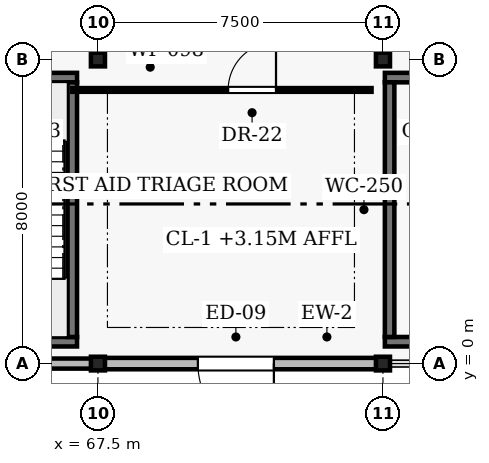
"""IFC4 building model, lengths in metres.
Left out: names, types, materials, properties, quantities, classifications, styles, units other than length and angle.
Written with IfcOpenShell. Run it as: python <this file> out.ifc"""

import sys

from ifc_helpers import new_model, si_unit, direction, frame, frame_2d, origin, origin_2d, place, context, subcontext, project, spatial, rectangle, i_section, extrude, element, fill, save


model = new_model("IFC4")
c1 = context("Model", 3, precision=1e-05, world=origin(), true_north=direction((0.0, 1.0)))
c2 = subcontext(c1, "Body", "Model", "MODEL_VIEW")
j1 = project(units=[si_unit("LENGTHUNIT", "METRE"), si_unit("PLANEANGLEUNIT", "RADIAN")], contexts=[c1])
p1 = place(None, origin())
s1 = spatial("IfcSite", under=j1, at=p1, CompositionType="ELEMENT")
p2 = place(p1, origin())
s2 = spatial("IfcBuilding", under=s1, at=p2, CompositionType="ELEMENT")
p3 = place(p2, origin())
s3 = spatial("IfcBuildingStorey", under=s2, at=p3, CompositionType="ELEMENT", Elevation=0.0)
for number, where, z_axis, x_axis in (
    (1, (67.5, 0.0, 0.0), (0.0, 0.0, 1.0), (1.0, 0.0, 0.0)),
    (2, (67.5, 8.0, 0.0), (0.0, 0.0, 1.0), (1.0, 0.0, 0.0)),
    (3, (75.0, 0.0, 0.0), (0.0, 0.0, 1.0), (1.0, 0.0, 0.0)),
    (4, (75.0, 8.0, 0.0), (0.0, 0.0, 1.0), (1.0, 0.0, 0.0)),
):
    element("IfcColumn", number, at=place(p3, frame(where, z_axis=z_axis, x_axis=x_axis)), inside=s3, PredefinedType="COLUMN", context=c2, shape_type="SweptSolid", body=[
        extrude(i_section(OverallWidth=0.37, OverallDepth=0.36, WebThickness=0.012, FlangeThickness=0.02, FilletRadius=0.015, at=origin_2d()), origin(), (0.0, 0.0, 1.0), 4.5),
    ])
p4 = place(p3, frame((60.08, 0.0, 0.0), z_axis=(0.0, 0.0, 1.0), x_axis=(1.0, 0.0, 0.0)))
e5 = element("IfcWall", 5, at=p4, inside=s3, PredefinedType="SOLIDWALL", context=c2, shape_type="SweptSolid", body=[
    extrude(rectangle(XDim=7.34, YDim=0.265, at=frame_2d((3.67, 0.0))), origin(), (0.0, 0.0, 1.0), 3.85),
])
p5 = place(p4, frame((1.2, 0.0, 1.05)))
e6 = element("IfcOpeningElement", 6, at=p5, cuts=e5, PredefinedType="OPENING", context=c2, shape_type="SweptSolid", body=[
    extrude(rectangle(XDim=1.2, YDim=1.8, at=frame_2d((0.6, 0.9))), frame((0.0, 0.142, 0.0), z_axis=(0.0, -1.0, 0.0), x_axis=(1.0, 0.0, 0.0)), (0.0, 0.0, 1.0), 0.285),
])
p6 = place(p4, frame((4.1, 0.0, 1.05)))
e7 = element("IfcOpeningElement", 7, at=p6, cuts=e5, PredefinedType="OPENING", context=c2, shape_type="SweptSolid", body=[
    extrude(rectangle(XDim=1.35, YDim=1.35, at=frame_2d((0.675, 0.675))), frame((0.0, 0.142, 0.0), z_axis=(0.0, -1.0, 0.0), x_axis=(1.0, 0.0, 0.0)), (0.0, 0.0, 1.0), 0.285),
])
p7 = place(p3, frame((67.58, 0.0, 0.0), z_axis=(0.0, 0.0, 1.0), x_axis=(1.0, 0.0, 0.0)))
e8 = element("IfcWall", 8, at=p7, inside=s3, PredefinedType="SOLIDWALL", context=c2, shape_type="SweptSolid", body=[
    extrude(rectangle(XDim=7.34, YDim=0.3, at=frame_2d((3.67, 0.0))), origin(), (0.0, 0.0, 1.0), 3.75),
])
p8 = place(p7, frame((2.55, 0.0, 0.0)))
e9 = element("IfcOpeningElement", 9, at=p8, cuts=e8, PredefinedType="OPENING", context=c2, shape_type="SweptSolid", body=[
    extrude(rectangle(XDim=2.0, YDim=2.2, at=frame_2d((1.0, 1.1))), frame((0.0, 0.16, 0.0), z_axis=(0.0, -1.0, 0.0), x_axis=(1.0, 0.0, 0.0)), (0.0, 0.0, 1.0), 0.32),
])
p9 = place(p3, frame((60.55, 0.575, 0.0), z_axis=(0.0, 0.0, 1.0), x_axis=(1.0, 0.0, 0.0)))
e10 = element("IfcWall", 10, at=p9, inside=s3, PredefinedType="SHEAR", context=c2, shape_type="SweptSolid", body=[
    extrude(rectangle(XDim=6.4, YDim=0.25, at=frame_2d((3.2, 0.0))), origin(), (0.0, 0.0, 1.0), 4.5),
])
p10 = place(p3, frame((60.55, 7.525, 0.0), z_axis=(0.0, 0.0, 1.0), x_axis=(1.0, 0.0, 0.0)))
e11 = element("IfcWall", 11, at=p10, inside=s3, PredefinedType="SHEAR", context=c2, shape_type="SweptSolid", body=[
    extrude(rectangle(XDim=6.4, YDim=0.25, at=frame_2d((3.2, 0.0))), origin(), (0.0, 0.0, 1.0), 4.5),
])
p11 = place(p10, frame((0.8, 0.0, 0.0)))
e12 = element("IfcOpeningElement", 12, at=p11, cuts=e11, PredefinedType="OPENING", context=c2, shape_type="SweptSolid", body=[
    extrude(rectangle(XDim=1.1, YDim=2.15, at=frame_2d((0.55, 1.075))), frame((0.0, 0.135, 0.0), z_axis=(0.0, -1.0, 0.0), x_axis=(1.0, 0.0, 0.0)), (0.0, 0.0, 1.0), 0.27),
])
p12 = place(p10, frame((3.775, 0.0, 0.0)))
e13 = element("IfcOpeningElement", 13, at=p12, cuts=e11, PredefinedType="OPENING", context=c2, shape_type="SweptSolid", body=[
    extrude(rectangle(XDim=1.25, YDim=2.15, at=frame_2d((0.625, 1.075))), frame((0.0, 0.135, 0.0), z_axis=(0.0, -1.0, 0.0), x_axis=(1.0, 0.0, 0.0)), (0.0, 0.0, 1.0), 0.27),
])
p13 = place(p3, frame((66.825, 0.7, 0.0), z_axis=(0.0, 0.0, 1.0), x_axis=(0.0, 1.0, 0.0)))
e14 = element("IfcWall", 14, at=p13, inside=s3, PredefinedType="SHEAR", context=c2, shape_type="SweptSolid", body=[
    extrude(rectangle(XDim=6.7, YDim=0.25, at=frame_2d((3.35, 0.0))), origin(), (0.0, 0.0, 1.0), 4.5),
])
p14 = place(p3, frame((75.05, 0.575, 0.0), z_axis=(0.0, 0.0, 1.0), x_axis=(1.0, 0.0, 0.0)))
e15 = element("IfcWall", 15, at=p14, inside=s3, PredefinedType="SHEAR", context=c2, shape_type="SweptSolid", body=[
    extrude(rectangle(XDim=6.4, YDim=0.25, at=frame_2d((3.2, 0.0))), origin(), (0.0, 0.0, 1.0), 4.5),
])
p15 = place(p3, frame((75.05, 7.525, 0.0), z_axis=(0.0, 0.0, 1.0), x_axis=(1.0, 0.0, 0.0)))
e16 = element("IfcWall", 16, at=p15, inside=s3, PredefinedType="SHEAR", context=c2, shape_type="SweptSolid", body=[
    extrude(rectangle(XDim=6.4, YDim=0.25, at=frame_2d((3.2, 0.0))), origin(), (0.0, 0.0, 1.0), 4.5),
])
p16 = place(p15, frame((3.775, 0.0, 0.0)))
e17 = element("IfcOpeningElement", 17, at=p16, cuts=e16, PredefinedType="OPENING", context=c2, shape_type="SweptSolid", body=[
    extrude(rectangle(XDim=1.25, YDim=2.15, at=frame_2d((0.625, 1.075))), frame((0.0, 0.135, 0.0), z_axis=(0.0, -1.0, 0.0), x_axis=(1.0, 0.0, 0.0)), (0.0, 0.0, 1.0), 0.27),
])
p17 = place(p3, frame((75.175, 0.7, 0.0), z_axis=(0.0, 0.0, 1.0), x_axis=(0.0, 1.0, 0.0)))
e18 = element("IfcWall", 18, at=p17, inside=s3, PredefinedType="SHEAR", context=c2, shape_type="SweptSolid", body=[
    extrude(rectangle(XDim=6.7, YDim=0.25, at=frame_2d((3.35, 0.0))), origin(), (0.0, 0.0, 1.0), 4.5),
])
p18 = place(p3, frame((66.825, 7.2, 0.0), z_axis=(0.0, 0.0, 1.0), x_axis=(1.0, 0.0, 0.0)))
e19 = element("IfcWall", 19, at=p18, inside=s3, PredefinedType="PARTITIONING", context=c2, shape_type="SweptSolid", body=[
    extrude(rectangle(XDim=7.875, YDim=0.098, at=frame_2d((3.938, 0.0))), origin(), (0.0, 0.0, 1.0), 3.7),
])
p19 = place(p18, frame((4.101, 0.0, 0.0)))
e20 = element("IfcOpeningElement", 20, at=p19, cuts=e19, PredefinedType="OPENING", context=c2, shape_type="SweptSolid", body=[
    extrude(rectangle(XDim=1.26, YDim=2.16, at=frame_2d((0.63, 1.08))), frame((0.0, 0.059, 0.0), z_axis=(0.0, -1.0, 0.0), x_axis=(1.0, 0.0, 0.0)), (0.0, 0.0, 1.0), 0.118),
])
p20 = place(p8, frame((2.0, 0.0, 0.0), z_axis=(0.0, 0.0, 1.0), x_axis=(-1.0, 0.0, 0.0)))
e21 = element("IfcDoor", 21, at=p20, inside=s3, OperationType="SINGLE_SWING_LEFT", PredefinedType="DOOR", context=c2, shape_type="SweptSolid", body=[
    extrude(rectangle(XDim=2.0, YDim=2.2, at=frame_2d((1.0, 1.1))), frame((0.0, 0.025, 0.0), z_axis=(0.0, -1.0, 0.0), x_axis=(1.0, 0.0, 0.0)), (0.0, 0.0, 1.0), 0.05),
])
fill(e9, e21)
p21 = place(p19, origin())
e22 = element("IfcDoor", 22, at=p21, inside=s3, OperationType="SINGLE_SWING_RIGHT", PredefinedType="DOOR", context=c2, shape_type="SweptSolid", body=[
    extrude(rectangle(XDim=1.26, YDim=2.16, at=frame_2d((0.63, 1.08))), frame((0.0, 0.025, 0.0), z_axis=(0.0, -1.0, 0.0), x_axis=(1.0, 0.0, 0.0)), (0.0, 0.0, 1.0), 0.05),
])
fill(e20, e22)
save(model, sys.argv[1])
